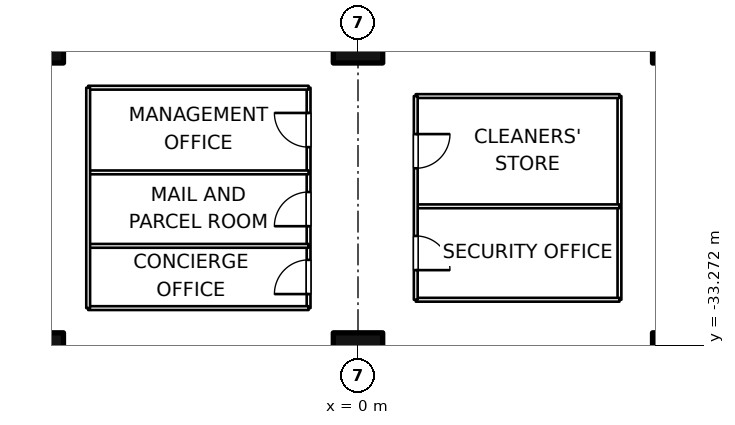
"""IFC4 building model, lengths in metres.
Left out: names, types, materials, properties, quantities, classifications, styles, units other than length and angle.
Written with IfcOpenShell. Run it as: python <this file> out.ifc"""

import sys

from ifc_helpers import new_model, si_unit, direction, frame, frame_2d, origin, origin_2d, place, context, subcontext, project, spatial, rectangle, extrude, element, fill, save


model = new_model("IFC4")
c1 = context("Model", 3, precision=1e-05, world=origin(), true_north=direction((0.0, 1.0)))
c2 = subcontext(c1, "Body", "Model", "MODEL_VIEW")
j1 = project(units=[si_unit("LENGTHUNIT", "METRE"), si_unit("PLANEANGLEUNIT", "RADIAN")], contexts=[c1])
p1 = place(None, origin())
s1 = spatial("IfcSite", under=j1, at=p1, CompositionType="ELEMENT")
p2 = place(p1, origin())
s2 = spatial("IfcBuilding", under=s1, at=p2, CompositionType="ELEMENT")
p3 = place(p2, origin())
s3 = spatial("IfcBuildingStorey", under=s2, at=p3, CompositionType="ELEMENT", Elevation=0.0)
for number, where, z_axis, x_axis in (
    (1, (-8.4, -33.6, 0.0), (0.0, 0.0, 1.0), (1.0, 0.0, 0.0)),
    (2, (-8.4, -25.2, 0.0), (0.0, 0.0, 1.0), (1.0, 0.0, 0.0)),
    (3, (0.0, -33.6, 0.0), (0.0, 0.0, 1.0), (1.0, 0.0, 0.0)),
    (4, (0.0, -25.2, 0.0), (0.0, 0.0, 1.0), (1.0, 0.0, 0.0)),
    (5, (8.4, -33.6, 0.0), (0.0, 0.0, 1.0), (1.0, 0.0, 0.0)),
    (6, (8.4, -25.2, 0.0), (0.0, 0.0, 1.0), (1.0, 0.0, 0.0)),
):
    element("IfcColumn", number, at=place(p3, frame(where, z_axis=z_axis, x_axis=x_axis)), inside=s3, PredefinedType="COLUMN", context=c2, shape_type="SweptSolid", body=[
        extrude(rectangle(XDim=1.3, YDim=1.3, at=origin_2d()), origin(), (0.0, 0.0, 1.0), 6.0),
    ])
p4 = place(p3, frame((-7.1, -32.3, 0.0), z_axis=(0.0, 0.0, 1.0), x_axis=(1.0, 0.0, 0.0)))
e7 = element("IfcWall", 7, at=p4, inside=s3, PredefinedType="PARTITIONING", context=c2, shape_type="SweptSolid", body=[
    extrude(rectangle(XDim=5.8, YDim=0.1, at=frame_2d((2.9, 0.0))), origin(), (0.0, 0.0, 1.0), 5.7),
])
p5 = place(p3, frame((-1.3, -32.3, 0.0), z_axis=(0.0, 0.0, 1.0), x_axis=(0.0, 1.0, 0.0)))
e8 = element("IfcWall", 8, at=p5, inside=s3, PredefinedType="PARTITIONING", context=c2, shape_type="SweptSolid", body=[
    extrude(rectangle(XDim=5.8, YDim=0.1, at=frame_2d((2.9, 0.0))), origin(), (0.0, 0.0, 1.0), 5.7),
])
p6 = place(p5, frame((0.369, 0.0, 0.0)))
e9 = element("IfcOpeningElement", 9, at=p6, cuts=e8, PredefinedType="OPENING", context=c2, shape_type="SweptSolid", body=[
    extrude(rectangle(XDim=0.9, YDim=2.1, at=frame_2d((0.45, 1.05))), frame((0.0, 0.06, 0.0), z_axis=(0.0, -1.0, 0.0), x_axis=(1.0, 0.0, 0.0)), (0.0, 0.0, 1.0), 0.12),
])
p7 = place(p5, frame((2.155, 0.0, 0.0)))
e10 = element("IfcOpeningElement", 10, at=p7, cuts=e8, PredefinedType="OPENING", context=c2, shape_type="SweptSolid", body=[
    extrude(rectangle(XDim=0.9, YDim=2.1, at=frame_2d((0.45, 1.05))), frame((0.0, 0.06, 0.0), z_axis=(0.0, -1.0, 0.0), x_axis=(1.0, 0.0, 0.0)), (0.0, 0.0, 1.0), 0.12),
])
p8 = place(p5, frame((4.236, 0.0, 0.0)))
e11 = element("IfcOpeningElement", 11, at=p8, cuts=e8, PredefinedType="OPENING", context=c2, shape_type="SweptSolid", body=[
    extrude(rectangle(XDim=0.9, YDim=2.1, at=frame_2d((0.45, 1.05))), frame((0.0, 0.06, 0.0), z_axis=(0.0, -1.0, 0.0), x_axis=(1.0, 0.0, 0.0)), (0.0, 0.0, 1.0), 0.12),
])
for number, where, z_axis, x_axis in (
    (12, (-1.3, -26.5, 0.0), (0.0, 0.0, 1.0), (-1.0, 0.0, 0.0)),
    (13, (-7.1, -26.5, 0.0), (0.0, 0.0, 1.0), (0.0, -1.0, 0.0)),
    (14, (-7.1, -30.662, 0.0), (0.0, 0.0, 1.0), (1.0, 0.0, 0.0)),
    (15, (-7.1, -28.728, 0.0), (0.0, 0.0, 1.0), (1.0, 0.0, 0.0)),
):
    element("IfcWall", number, at=place(p3, frame(where, z_axis=z_axis, x_axis=x_axis)), inside=s3, PredefinedType="PARTITIONING", context=c2, shape_type="SweptSolid", body=[
        extrude(rectangle(XDim=5.8, YDim=0.1, at=frame_2d((2.9, 0.0))), origin(), (0.0, 0.0, 1.0), 5.7),
    ])
p9 = place(p3, frame((1.52, -32.08, 0.0), z_axis=(0.0, 0.0, 1.0), x_axis=(1.0, 0.0, 0.0)))
e16 = element("IfcWall", 16, at=p9, inside=s3, PredefinedType="PARTITIONING", context=c2, shape_type="SweptSolid", body=[
    extrude(rectangle(XDim=5.36, YDim=0.1, at=frame_2d((2.68, 0.0))), origin(), (0.0, 0.0, 1.0), 5.7),
])
p10 = place(p3, frame((6.88, -32.08, 0.0), z_axis=(0.0, 0.0, 1.0), x_axis=(0.0, 1.0, 0.0)))
e17 = element("IfcWall", 17, at=p10, inside=s3, PredefinedType="PARTITIONING", context=c2, shape_type="SweptSolid", body=[
    extrude(rectangle(XDim=5.36, YDim=0.1, at=frame_2d((2.68, 0.0))), origin(), (0.0, 0.0, 1.0), 5.7),
])
p11 = place(p3, frame((6.88, -26.72, 0.0), z_axis=(0.0, 0.0, 1.0), x_axis=(-1.0, 0.0, 0.0)))
e18 = element("IfcWall", 18, at=p11, inside=s3, PredefinedType="PARTITIONING", context=c2, shape_type="SweptSolid", body=[
    extrude(rectangle(XDim=5.36, YDim=0.1, at=frame_2d((2.68, 0.0))), origin(), (0.0, 0.0, 1.0), 5.7),
])
p12 = place(p3, frame((1.52, -26.72, 0.0), z_axis=(0.0, 0.0, 1.0), x_axis=(0.0, -1.0, 0.0)))
e19 = element("IfcWall", 19, at=p12, inside=s3, PredefinedType="PARTITIONING", context=c2, shape_type="SweptSolid", body=[
    extrude(rectangle(XDim=5.36, YDim=0.1, at=frame_2d((2.68, 0.0))), origin(), (0.0, 0.0, 1.0), 5.7),
])
p13 = place(p12, frame((3.681, 0.0, 0.0)))
e20 = element("IfcOpeningElement", 20, at=p13, cuts=e19, PredefinedType="OPENING", context=c2, shape_type="SweptSolid", body=[
    extrude(rectangle(XDim=0.9, YDim=2.1, at=frame_2d((0.45, 1.05))), frame((0.0, 0.06, 0.0), z_axis=(0.0, -1.0, 0.0), x_axis=(1.0, 0.0, 0.0)), (0.0, 0.0, 1.0), 0.12),
])
p14 = place(p12, frame((1.001, 0.0, 0.0)))
e21 = element("IfcOpeningElement", 21, at=p14, cuts=e19, PredefinedType="OPENING", context=c2, shape_type="SweptSolid", body=[
    extrude(rectangle(XDim=0.9, YDim=2.1, at=frame_2d((0.45, 1.05))), frame((0.0, 0.06, 0.0), z_axis=(0.0, -1.0, 0.0), x_axis=(1.0, 0.0, 0.0)), (0.0, 0.0, 1.0), 0.12),
])
p15 = place(p3, frame((1.52, -29.621, 0.0), z_axis=(0.0, 0.0, 1.0), x_axis=(1.0, 0.0, 0.0)))
e22 = element("IfcWall", 22, at=p15, inside=s3, PredefinedType="PARTITIONING", context=c2, shape_type="SweptSolid", body=[
    extrude(rectangle(XDim=5.36, YDim=0.1, at=frame_2d((2.68, 0.0))), origin(), (0.0, 0.0, 1.0), 5.7),
])
p16 = place(p3, frame((-0.15, -12.038, 0.0), z_axis=(0.0, 0.0, 1.0), x_axis=(-0.866026292622, -0.499998460486, 0.0)))
e23 = element("IfcWall", 23, at=p16, inside=s3, PredefinedType="SOLIDWALL", context=c2, shape_type="SweptSolid", body=[
    extrude(rectangle(XDim=41.883, YDim=0.3, at=frame_2d((20.941, 0.0))), origin(), (0.0, 0.0, 1.0), 5.7),
])
p17 = place(p16, frame((25.383, 0.0, 0.0)))
e24 = element("IfcOpeningElement", 24, at=p17, cuts=e23, PredefinedType="OPENING", context=c2, shape_type="SweptSolid", body=[
    extrude(rectangle(XDim=1.8, YDim=2.4, at=frame_2d((0.9, 1.2))), frame((0.0, 0.16, 0.0), z_axis=(0.0, -1.0, 0.0), x_axis=(1.0, 0.0, 0.0)), (0.0, 0.0, 1.0), 0.32),
])
p18 = place(p3, frame((-0.9, -11.432, 0.0), z_axis=(0.0, 0.0, 1.0), x_axis=(0.866025301493, -0.500000177174, 0.0)))
e25 = element("IfcWall", 25, at=p18, inside=s3, PredefinedType="SOLIDWALL", context=c2, shape_type="SweptSolid", body=[
    extrude(rectangle(XDim=43.095, YDim=0.3, at=frame_2d((21.548, 0.0))), origin(), (0.0, 0.0, 1.0), 5.7),
])
p19 = place(p18, frame((26.595, 0.0, 0.0)))
e26 = element("IfcOpeningElement", 26, at=p19, cuts=e25, PredefinedType="OPENING", context=c2, shape_type="SweptSolid", body=[
    extrude(rectangle(XDim=1.8, YDim=2.4, at=frame_2d((0.9, 1.2))), frame((0.0, 0.16, 0.0), z_axis=(0.0, -1.0, 0.0), x_axis=(1.0, 0.0, 0.0)), (0.0, 0.0, 1.0), 0.32),
])
p20 = place(p6, origin())
e27 = element("IfcDoor", 27, at=p20, inside=s3, OperationType="SINGLE_SWING_LEFT", PredefinedType="DOOR", context=c2, shape_type="SweptSolid", body=[
    extrude(rectangle(XDim=0.9, YDim=2.1, at=frame_2d((0.45, 1.05))), frame((0.0, 0.025, 0.0), z_axis=(0.0, -1.0, 0.0), x_axis=(1.0, 0.0, 0.0)), (0.0, 0.0, 1.0), 0.05),
])
fill(e9, e27)
p21 = place(p7, origin())
e28 = element("IfcDoor", 28, at=p21, inside=s3, OperationType="SINGLE_SWING_LEFT", PredefinedType="DOOR", context=c2, shape_type="SweptSolid", body=[
    extrude(rectangle(XDim=0.9, YDim=2.1, at=frame_2d((0.45, 1.05))), frame((0.0, 0.025, 0.0), z_axis=(0.0, -1.0, 0.0), x_axis=(1.0, 0.0, 0.0)), (0.0, 0.0, 1.0), 0.05),
])
fill(e10, e28)
p22 = place(p8, origin())
e29 = element("IfcDoor", 29, at=p22, inside=s3, OperationType="SINGLE_SWING_RIGHT", PredefinedType="DOOR", context=c2, shape_type="SweptSolid", body=[
    extrude(rectangle(XDim=0.9, YDim=2.1, at=frame_2d((0.45, 1.05))), frame((0.0, 0.025, 0.0), z_axis=(0.0, -1.0, 0.0), x_axis=(1.0, 0.0, 0.0)), (0.0, 0.0, 1.0), 0.05),
])
fill(e11, e29)
p23 = place(p13, origin())
e30 = element("IfcDoor", 30, at=p23, inside=s3, OperationType="SINGLE_SWING_RIGHT", PredefinedType="DOOR", context=c2, shape_type="SweptSolid", body=[
    extrude(rectangle(XDim=0.9, YDim=2.1, at=frame_2d((0.45, 1.05))), frame((0.0, 0.025, 0.0), z_axis=(0.0, -1.0, 0.0), x_axis=(1.0, 0.0, 0.0)), (0.0, 0.0, 1.0), 0.05),
])
fill(e20, e30)
p24 = place(p14, origin())
e31 = element("IfcDoor", 31, at=p24, inside=s3, OperationType="SINGLE_SWING_LEFT", PredefinedType="DOOR", context=c2, shape_type="SweptSolid", body=[
    extrude(rectangle(XDim=0.9, YDim=2.1, at=frame_2d((0.45, 1.05))), frame((0.0, 0.025, 0.0), z_axis=(0.0, -1.0, 0.0), x_axis=(1.0, 0.0, 0.0)), (0.0, 0.0, 1.0), 0.05),
])
fill(e21, e31)
save(model, sys.argv[1])
